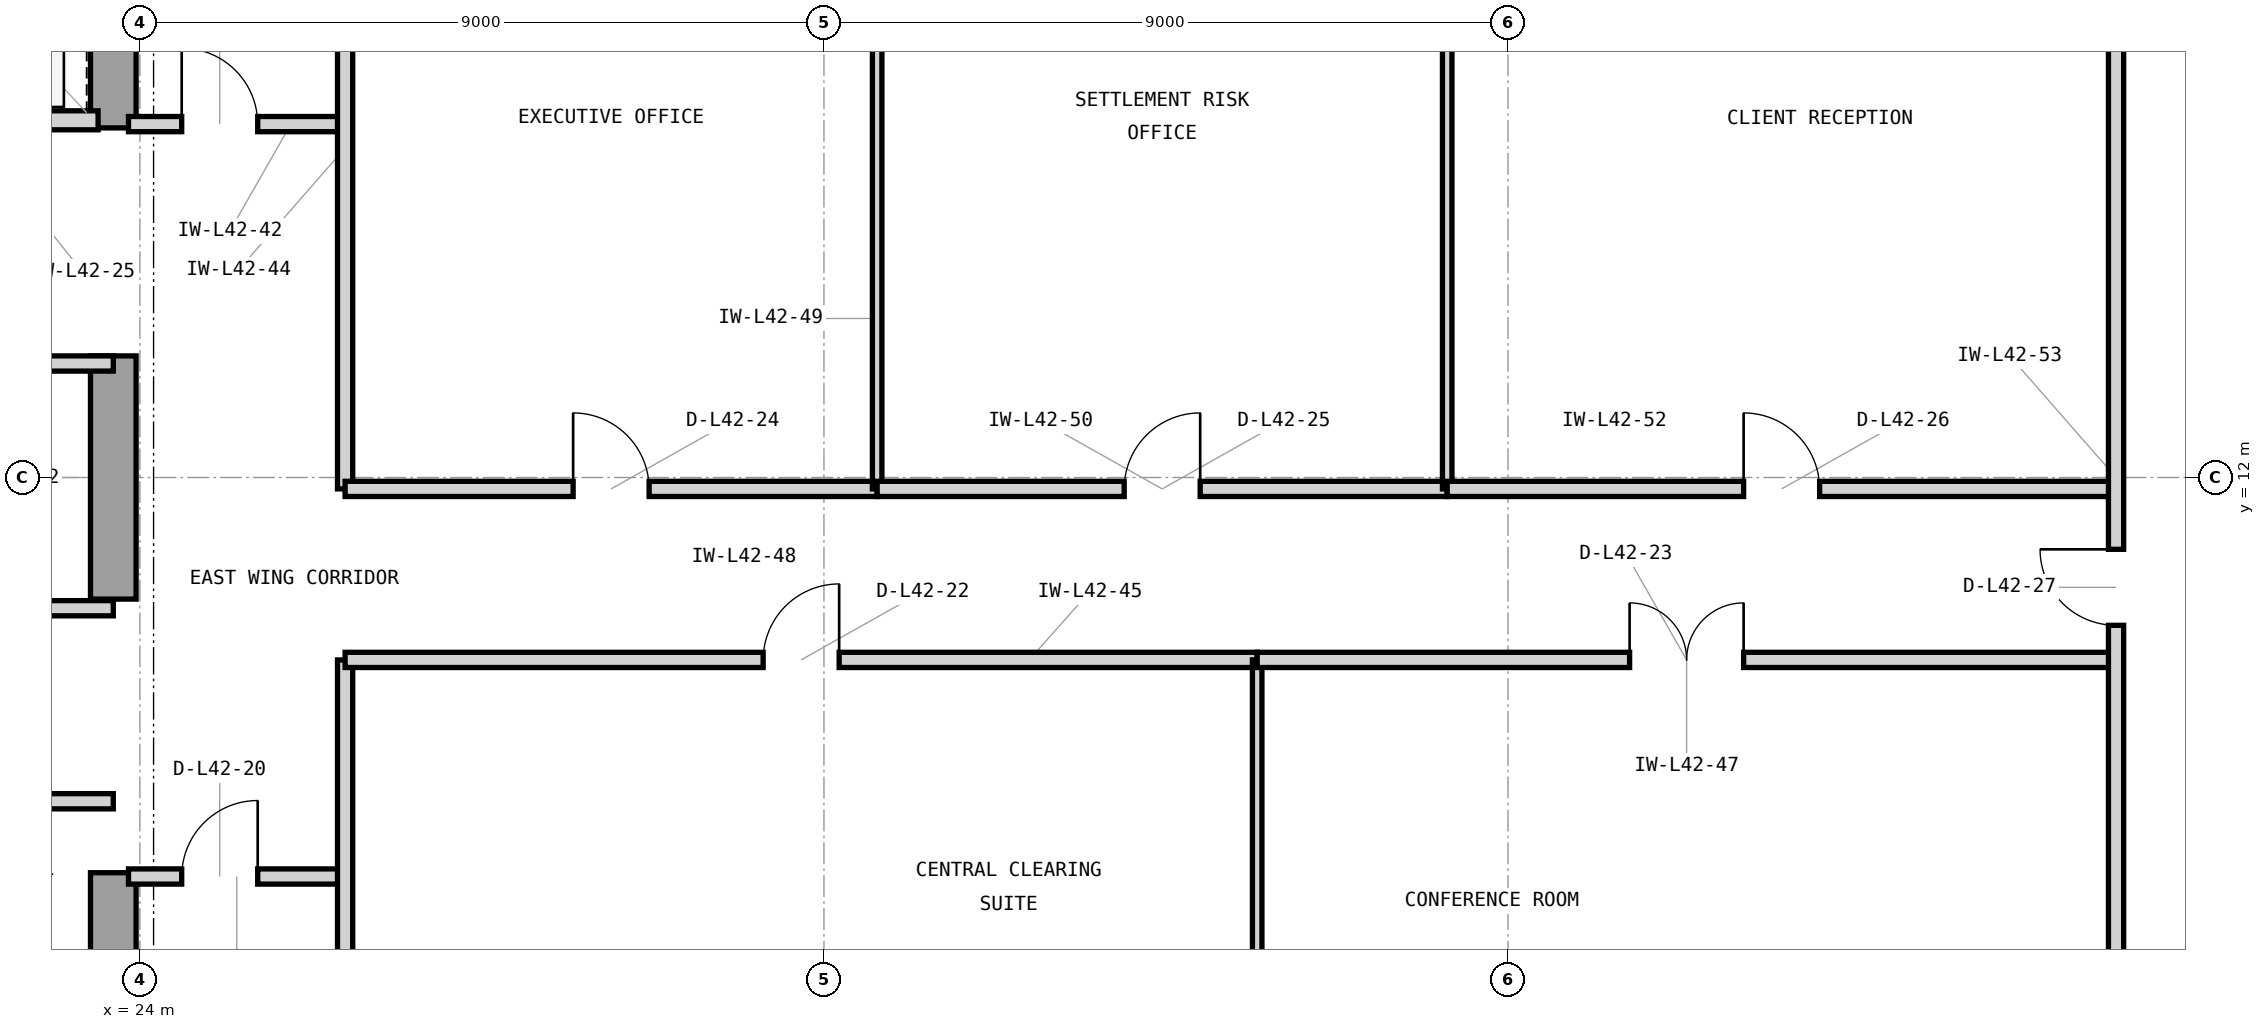
"""IFC4 building model, lengths in metres.
Left out: names, types, materials, properties, quantities, classifications, styles, units other than length and angle.
Written with IfcOpenShell. Run it as: python <this file> out.ifc"""

import sys

from ifc_helpers import new_model, si_unit, direction, frame, frame_2d, origin, place, context, subcontext, project, spatial, rectangle, extrude, element, fill, save


model = new_model("IFC4")
c1 = context("Model", 3, precision=1e-05, world=origin(), true_north=direction((0.0, 1.0)))
c2 = subcontext(c1, "Body", "Model", "MODEL_VIEW")
j1 = project(units=[si_unit("LENGTHUNIT", "METRE"), si_unit("PLANEANGLEUNIT", "RADIAN")], contexts=[c1])
p1 = place(None, origin())
s1 = spatial("IfcSite", under=j1, at=p1, CompositionType="ELEMENT")
p2 = place(p1, origin())
s2 = spatial("IfcBuilding", under=s1, at=p2, CompositionType="ELEMENT")
p3 = place(p2, frame((0.0, 0.0, 176.1)))
s3 = spatial("IfcBuildingStorey", under=s2, at=p3, CompositionType="ELEMENT", Elevation=176.1)
p4 = place(p3, frame((23.65, 3.65, 0.0), z_axis=(0.0, 0.0, 1.0), x_axis=(0.0, 1.0, 0.0)))
e1 = element("IfcWall", 1, at=p4, inside=s3, PredefinedType="SHEAR", context=c2, shape_type="SweptSolid", body=[
    extrude(rectangle(XDim=3.15, YDim=0.6, at=frame_2d((1.575, 0.0))), origin(), (0.0, 0.0, 1.0), 3.9),
])
p5 = place(p3, frame((23.65, 10.4, 0.0), z_axis=(0.0, 0.0, 1.0), x_axis=(0.0, 1.0, 0.0)))
e2 = element("IfcWall", 2, at=p5, inside=s3, PredefinedType="SHEAR", context=c2, shape_type="SweptSolid", body=[
    extrude(rectangle(XDim=3.2, YDim=0.6, at=frame_2d((1.6, 0.0))), origin(), (0.0, 0.0, 1.0), 3.9),
])
p6 = place(p3, frame((23.65, 16.6, 0.0), z_axis=(0.0, 0.0, 1.0), x_axis=(0.0, 1.0, 0.0)))
e3 = element("IfcWall", 3, at=p6, inside=s3, PredefinedType="SHEAR", context=c2, shape_type="SweptSolid", body=[
    extrude(rectangle(XDim=4.05, YDim=0.6, at=frame_2d((2.025, 0.0))), origin(), (0.0, 0.0, 1.0), 3.9),
])
p7 = place(p3, frame((21.05, 16.7, 0.0), z_axis=(0.0, 0.0, 1.0), x_axis=(1.0, 0.0, 0.0)))
e4 = element("IfcWall", 4, at=p7, inside=s3, PredefinedType="PARTITIONING", context=c2, shape_type="SweptSolid", body=[
    extrude(rectangle(XDim=2.4, YDim=0.25, at=frame_2d((1.2, 0.0))), origin(), (0.0, 0.0, 1.0), 3.283),
])
p8 = place(p7, frame((0.52, 0.0, 0.0)))
e5 = element("IfcOpeningElement", 5, at=p8, cuts=e4, PredefinedType="OPENING", context=c2, shape_type="SweptSolid", body=[
    extrude(rectangle(XDim=1.15, YDim=2.25, at=frame_2d((0.575, 1.125))), frame((0.0, 0.135, 0.0), z_axis=(0.0, -1.0, 0.0), x_axis=(1.0, 0.0, 0.0)), (0.0, 0.0, 1.0), 0.27),
])
p9 = place(p3, frame((20.65, 7.74, 0.0), z_axis=(0.0, 0.0, 1.0), x_axis=(1.0, 0.0, 0.0)))
e6 = element("IfcWall", 6, at=p9, inside=s3, PredefinedType="PARTITIONING", context=c2, shape_type="SweptSolid", body=[
    extrude(rectangle(XDim=3.0, YDim=0.2, at=frame_2d((1.5, 0.0))), origin(), (0.0, 0.0, 1.0), 3.69),
])
p10 = place(p9, frame((1.025, 0.0, 0.0)))
e7 = element("IfcOpeningElement", 7, at=p10, cuts=e6, PredefinedType="OPENING", context=c2, shape_type="SweptSolid", body=[
    extrude(rectangle(XDim=0.95, YDim=2.1, at=frame_2d((0.475, 1.05))), frame((0.0, 0.11, 0.0), z_axis=(0.0, -1.0, 0.0), x_axis=(1.0, 0.0, 0.0)), (0.0, 0.0, 1.0), 0.22),
])
p11 = place(p3, frame((14.825, 10.28, 0.0), z_axis=(0.0, 0.0, 1.0), x_axis=(1.0, 0.0, 0.0)))
e8 = element("IfcWall", 8, at=p11, inside=s3, PredefinedType="PARTITIONING", context=c2, shape_type="SweptSolid", body=[
    extrude(rectangle(XDim=8.825, YDim=0.2, at=frame_2d((4.413, 0.0))), origin(), (0.0, 0.0, 1.0), 3.69),
])
p12 = place(p3, frame((18.45, 13.5, 0.0), z_axis=(0.0, 0.0, 1.0), x_axis=(1.0, 0.0, 0.0)))
e9 = element("IfcWall", 9, at=p12, inside=s3, PredefinedType="PARTITIONING", context=c2, shape_type="SweptSolid", body=[
    extrude(rectangle(XDim=5.2, YDim=0.2, at=frame_2d((2.6, 0.0))), origin(), (0.0, 0.0, 1.0), 3.283),
])
p13 = place(p12, frame((2.125, 0.0, 0.0)))
e10 = element("IfcOpeningElement", 10, at=p13, cuts=e9, PredefinedType="OPENING", context=c2, shape_type="SweptSolid", body=[
    extrude(rectangle(XDim=0.95, YDim=2.1, at=frame_2d((0.475, 1.05))), frame((0.0, 0.11, 0.0), z_axis=(0.0, -1.0, 0.0), x_axis=(1.0, 0.0, 0.0)), (0.0, 0.0, 1.0), 0.22),
])
p14 = place(p3, frame((23.85, 6.75, 0.0), z_axis=(0.0, 0.0, 1.0), x_axis=(1.0, 0.0, 0.0)))
e11 = element("IfcWall", 11, at=p14, inside=s3, PredefinedType="PARTITIONING", context=c2, shape_type="SweptSolid", body=[
    extrude(rectangle(XDim=2.85, YDim=0.2, at=frame_2d((1.425, 0.0))), origin(), (0.0, 0.0, 1.0), 3.69),
])
p15 = place(p14, frame((0.7, 0.0, 0.0)))
e12 = element("IfcOpeningElement", 12, at=p15, cuts=e11, PredefinedType="OPENING", context=c2, shape_type="SweptSolid", body=[
    extrude(rectangle(XDim=1.0, YDim=2.15, at=frame_2d((0.5, 1.075))), frame((0.0, 0.11, 0.0), z_axis=(0.0, -1.0, 0.0), x_axis=(1.0, 0.0, 0.0)), (0.0, 0.0, 1.0), 0.22),
])
p16 = place(p3, frame((23.85, 16.65, 0.0), z_axis=(0.0, 0.0, 1.0), x_axis=(1.0, 0.0, 0.0)))
e13 = element("IfcWall", 13, at=p16, inside=s3, PredefinedType="PARTITIONING", context=c2, shape_type="SweptSolid", body=[
    extrude(rectangle(XDim=2.85, YDim=0.2, at=frame_2d((1.425, 0.0))), origin(), (0.0, 0.0, 1.0), 3.69),
])
p17 = place(p16, frame((0.7, 0.0, 0.0)))
e14 = element("IfcOpeningElement", 14, at=p17, cuts=e13, PredefinedType="OPENING", context=c2, shape_type="SweptSolid", body=[
    extrude(rectangle(XDim=1.0, YDim=2.15, at=frame_2d((0.5, 1.075))), frame((0.0, 0.11, 0.0), z_axis=(0.0, -1.0, 0.0), x_axis=(1.0, 0.0, 0.0)), (0.0, 0.0, 1.0), 0.22),
])
p18 = place(p3, frame((26.7, 3.18, 0.0), z_axis=(0.0, 0.0, 1.0), x_axis=(0.0, 1.0, 0.0)))
e15 = element("IfcWall", 15, at=p18, inside=s3, PredefinedType="PARTITIONING", context=c2, shape_type="SweptSolid", body=[
    extrude(rectangle(XDim=6.42, YDim=0.2, at=frame_2d((3.21, 0.0))), origin(), (0.0, 0.0, 1.0), 3.69),
])
p19 = place(p3, frame((26.7, 11.85, 0.0), z_axis=(0.0, 0.0, 1.0), x_axis=(0.0, 1.0, 0.0)))
e16 = element("IfcWall", 16, at=p19, inside=s3, PredefinedType="PARTITIONING", context=c2, shape_type="SweptSolid", body=[
    extrude(rectangle(XDim=8.97, YDim=0.2, at=frame_2d((4.485, 0.0))), origin(), (0.0, 0.0, 1.0), 3.69),
])
p20 = place(p3, frame((26.7, 9.6, 0.0), z_axis=(0.0, 0.0, 1.0), x_axis=(1.0, 0.0, 0.0)))
e17 = element("IfcWall", 17, at=p20, inside=s3, PredefinedType="PARTITIONING", context=c2, shape_type="SweptSolid", body=[
    extrude(rectangle(XDim=12.0, YDim=0.2, at=frame_2d((6.0, 0.0))), origin(), (0.0, 0.0, 1.0), 3.69),
])
p21 = place(p20, frame((5.5, 0.0, 0.0)))
e18 = element("IfcOpeningElement", 18, at=p21, cuts=e17, PredefinedType="OPENING", context=c2, shape_type="SweptSolid", body=[
    extrude(rectangle(XDim=1.0, YDim=2.15, at=frame_2d((0.5, 1.075))), frame((0.0, 0.11, 0.0), z_axis=(0.0, -1.0, 0.0), x_axis=(1.0, 0.0, 0.0)), (0.0, 0.0, 1.0), 0.22),
])
p22 = place(p3, frame((38.7, 3.18, 0.0), z_axis=(0.0, 0.0, 1.0), x_axis=(0.0, 1.0, 0.0)))
e19 = element("IfcWall", 19, at=p22, inside=s3, PredefinedType="PARTITIONING", context=c2, shape_type="SweptSolid", body=[
    extrude(rectangle(XDim=6.42, YDim=0.125, at=frame_2d((3.21, 0.0))), origin(), (0.0, 0.0, 1.0), 3.69),
])
p23 = place(p3, frame((38.7, 9.6, 0.0), z_axis=(0.0, 0.0, 1.0), x_axis=(1.0, 0.0, 0.0)))
e20 = element("IfcWall", 20, at=p23, inside=s3, PredefinedType="PARTITIONING", context=c2, shape_type="SweptSolid", body=[
    extrude(rectangle(XDim=11.3, YDim=0.2, at=frame_2d((5.65, 0.0))), origin(), (0.0, 0.0, 1.0), 3.69),
])
p24 = place(p23, frame((4.9, 0.0, 0.0)))
e21 = element("IfcOpeningElement", 21, at=p24, cuts=e20, PredefinedType="OPENING", context=c2, shape_type="SweptSolid", body=[
    extrude(rectangle(XDim=1.5, YDim=2.3, at=frame_2d((0.75, 1.15))), frame((0.0, 0.11, 0.0), z_axis=(0.0, -1.0, 0.0), x_axis=(1.0, 0.0, 0.0)), (0.0, 0.0, 1.0), 0.22),
])
p25 = place(p3, frame((26.7, 11.85, 0.0), z_axis=(0.0, 0.0, 1.0), x_axis=(1.0, 0.0, 0.0)))
e22 = element("IfcWall", 22, at=p25, inside=s3, PredefinedType="PARTITIONING", context=c2, shape_type="SweptSolid", body=[
    extrude(rectangle(XDim=7.0, YDim=0.2, at=frame_2d((3.5, 0.0))), origin(), (0.0, 0.0, 1.0), 3.69),
])
p26 = place(p25, frame((3.0, 0.0, 0.0)))
e23 = element("IfcOpeningElement", 23, at=p26, cuts=e22, PredefinedType="OPENING", context=c2, shape_type="SweptSolid", body=[
    extrude(rectangle(XDim=1.0, YDim=2.15, at=frame_2d((0.5, 1.075))), frame((0.0, 0.11, 0.0), z_axis=(0.0, -1.0, 0.0), x_axis=(1.0, 0.0, 0.0)), (0.0, 0.0, 1.0), 0.22),
])
p27 = place(p3, frame((33.7, 11.85, 0.0), z_axis=(0.0, 0.0, 1.0), x_axis=(0.0, 1.0, 0.0)))
e24 = element("IfcWall", 24, at=p27, inside=s3, PredefinedType="PARTITIONING", context=c2, shape_type="SweptSolid", body=[
    extrude(rectangle(XDim=8.97, YDim=0.125, at=frame_2d((4.485, 0.0))), origin(), (0.0, 0.0, 1.0), 3.69),
])
p28 = place(p3, frame((33.7, 11.85, 0.0), z_axis=(0.0, 0.0, 1.0), x_axis=(1.0, 0.0, 0.0)))
e25 = element("IfcWall", 25, at=p28, inside=s3, PredefinedType="PARTITIONING", context=c2, shape_type="SweptSolid", body=[
    extrude(rectangle(XDim=7.5, YDim=0.2, at=frame_2d((3.75, 0.0))), origin(), (0.0, 0.0, 1.0), 3.69),
])
p29 = place(p28, frame((3.25, 0.0, 0.0)))
e26 = element("IfcOpeningElement", 26, at=p29, cuts=e25, PredefinedType="OPENING", context=c2, shape_type="SweptSolid", body=[
    extrude(rectangle(XDim=1.0, YDim=2.15, at=frame_2d((0.5, 1.075))), frame((0.0, 0.11, 0.0), z_axis=(0.0, -1.0, 0.0), x_axis=(1.0, 0.0, 0.0)), (0.0, 0.0, 1.0), 0.22),
])
p30 = place(p3, frame((41.2, 11.85, 0.0), z_axis=(0.0, 0.0, 1.0), x_axis=(0.0, 1.0, 0.0)))
e27 = element("IfcWall", 27, at=p30, inside=s3, PredefinedType="PARTITIONING", context=c2, shape_type="SweptSolid", body=[
    extrude(rectangle(XDim=8.97, YDim=0.125, at=frame_2d((4.485, 0.0))), origin(), (0.0, 0.0, 1.0), 3.69),
])
p31 = place(p3, frame((41.2, 11.85, 0.0), z_axis=(0.0, 0.0, 1.0), x_axis=(1.0, 0.0, 0.0)))
e28 = element("IfcWall", 28, at=p31, inside=s3, PredefinedType="PARTITIONING", context=c2, shape_type="SweptSolid", body=[
    extrude(rectangle(XDim=8.8, YDim=0.2, at=frame_2d((4.4, 0.0))), origin(), (0.0, 0.0, 1.0), 3.69),
])
p32 = place(p31, frame((3.9, 0.0, 0.0)))
e29 = element("IfcOpeningElement", 29, at=p32, cuts=e28, PredefinedType="OPENING", context=c2, shape_type="SweptSolid", body=[
    extrude(rectangle(XDim=1.0, YDim=2.15, at=frame_2d((0.5, 1.075))), frame((0.0, 0.11, 0.0), z_axis=(0.0, -1.0, 0.0), x_axis=(1.0, 0.0, 0.0)), (0.0, 0.0, 1.0), 0.22),
])
p33 = place(p3, frame((50.0, 3.18, 0.0), z_axis=(0.0, 0.0, 1.0), x_axis=(0.0, 1.0, 0.0)))
e30 = element("IfcWall", 30, at=p33, inside=s3, PredefinedType="PARTITIONING", context=c2, shape_type="SweptSolid", body=[
    extrude(rectangle(XDim=17.64, YDim=0.2, at=frame_2d((8.82, 0.0))), origin(), (0.0, 0.0, 1.0), 3.69),
])
p34 = place(p33, frame((6.875, 0.0, 0.0)))
e31 = element("IfcOpeningElement", 31, at=p34, cuts=e30, PredefinedType="OPENING", context=c2, shape_type="SweptSolid", body=[
    extrude(rectangle(XDim=1.0, YDim=2.15, at=frame_2d((0.5, 1.075))), frame((0.0, 0.11, 0.0), z_axis=(0.0, -1.0, 0.0), x_axis=(1.0, 0.0, 0.0)), (0.0, 0.0, 1.0), 0.22),
])
p35 = place(p15, origin())
e32 = element("IfcDoor", 32, at=p35, inside=s3, OperationType="SINGLE_SWING_RIGHT", PredefinedType="DOOR", context=c2, shape_type="SweptSolid", body=[
    extrude(rectangle(XDim=1.0, YDim=2.15, at=frame_2d((0.5, 1.075))), frame((0.0, 0.025, 0.0), z_axis=(0.0, -1.0, 0.0), x_axis=(1.0, 0.0, 0.0)), (0.0, 0.0, 1.0), 0.05),
])
fill(e12, e32)
p36 = place(p17, origin())
e33 = element("IfcDoor", 33, at=p36, inside=s3, OperationType="SINGLE_SWING_LEFT", PredefinedType="DOOR", context=c2, shape_type="SweptSolid", body=[
    extrude(rectangle(XDim=1.0, YDim=2.15, at=frame_2d((0.5, 1.075))), frame((0.0, 0.025, 0.0), z_axis=(0.0, -1.0, 0.0), x_axis=(1.0, 0.0, 0.0)), (0.0, 0.0, 1.0), 0.05),
])
fill(e14, e33)
p37 = place(p21, origin())
e34 = element("IfcDoor", 34, at=p37, inside=s3, OperationType="SINGLE_SWING_RIGHT", PredefinedType="DOOR", context=c2, shape_type="SweptSolid", body=[
    extrude(rectangle(XDim=1.0, YDim=2.15, at=frame_2d((0.5, 1.075))), frame((0.0, 0.025, 0.0), z_axis=(0.0, -1.0, 0.0), x_axis=(1.0, 0.0, 0.0)), (0.0, 0.0, 1.0), 0.05),
])
fill(e18, e34)
p38 = place(p24, origin())
e35 = element("IfcDoor", 35, at=p38, inside=s3, OperationType="DOUBLE_DOOR_SINGLE_SWING", PredefinedType="DOOR", context=c2, shape_type="SweptSolid", body=[
    extrude(rectangle(XDim=1.5, YDim=2.3, at=frame_2d((0.75, 1.15))), frame((0.0, 0.025, 0.0), z_axis=(0.0, -1.0, 0.0), x_axis=(1.0, 0.0, 0.0)), (0.0, 0.0, 1.0), 0.05),
])
fill(e21, e35)
p39 = place(p26, origin())
e36 = element("IfcDoor", 36, at=p39, inside=s3, OperationType="SINGLE_SWING_LEFT", PredefinedType="DOOR", context=c2, shape_type="SweptSolid", body=[
    extrude(rectangle(XDim=1.0, YDim=2.15, at=frame_2d((0.5, 1.075))), frame((0.0, 0.025, 0.0), z_axis=(0.0, -1.0, 0.0), x_axis=(1.0, 0.0, 0.0)), (0.0, 0.0, 1.0), 0.05),
])
fill(e23, e36)
p40 = place(p29, origin())
e37 = element("IfcDoor", 37, at=p40, inside=s3, OperationType="SINGLE_SWING_RIGHT", PredefinedType="DOOR", context=c2, shape_type="SweptSolid", body=[
    extrude(rectangle(XDim=1.0, YDim=2.15, at=frame_2d((0.5, 1.075))), frame((0.0, 0.025, 0.0), z_axis=(0.0, -1.0, 0.0), x_axis=(1.0, 0.0, 0.0)), (0.0, 0.0, 1.0), 0.05),
])
fill(e26, e37)
p41 = place(p32, origin())
e38 = element("IfcDoor", 38, at=p41, inside=s3, OperationType="SINGLE_SWING_LEFT", PredefinedType="DOOR", context=c2, shape_type="SweptSolid", body=[
    extrude(rectangle(XDim=1.0, YDim=2.15, at=frame_2d((0.5, 1.075))), frame((0.0, 0.025, 0.0), z_axis=(0.0, -1.0, 0.0), x_axis=(1.0, 0.0, 0.0)), (0.0, 0.0, 1.0), 0.05),
])
fill(e29, e38)
p42 = place(p34, origin())
e39 = element("IfcDoor", 39, at=p42, inside=s3, OperationType="SINGLE_SWING_RIGHT", PredefinedType="DOOR", context=c2, shape_type="SweptSolid", body=[
    extrude(rectangle(XDim=1.0, YDim=2.15, at=frame_2d((0.5, 1.075))), frame((0.0, 0.025, 0.0), z_axis=(0.0, -1.0, 0.0), x_axis=(1.0, 0.0, 0.0)), (0.0, 0.0, 1.0), 0.05),
])
fill(e31, e39)
save(model, sys.argv[1])
